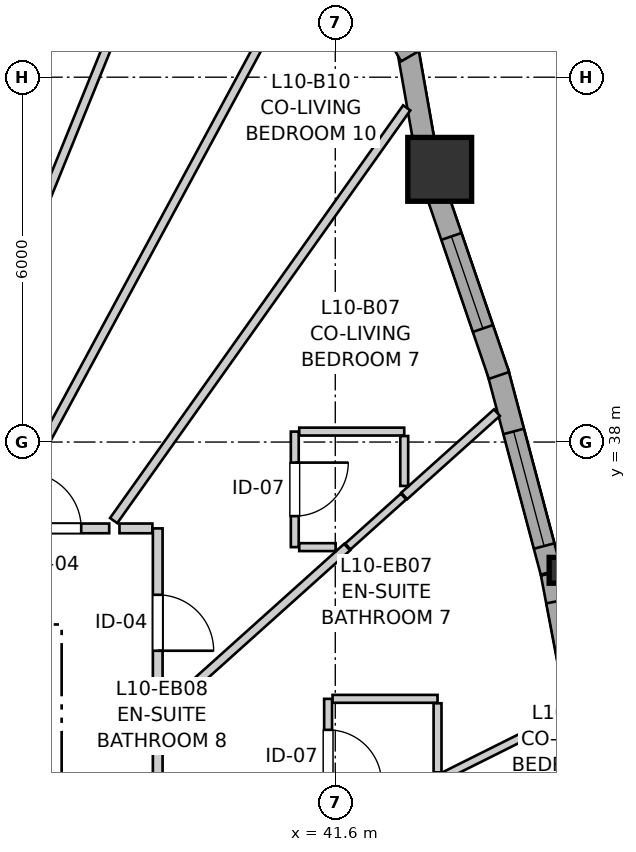
"""IFC4 building model, lengths in metres.
Left out: names, types, materials, properties, quantities, classifications, styles, units other than length and angle.
Written with IfcOpenShell. Run it as: python <this file> out.ifc"""

import sys

from ifc_helpers import new_model, si_unit, direction, frame, frame_2d, origin, origin_2d, place, context, subcontext, project, spatial, rectangle, i_section, extrude, source, transform, mapped, element, fill, save


model = new_model("IFC4")
c1 = context("Model", 3, precision=1e-05, world=origin(), true_north=direction((0.0, 1.0)))
c2 = subcontext(c1, "Body", "Model", "MODEL_VIEW")
j1 = project(units=[si_unit("LENGTHUNIT", "METRE"), si_unit("PLANEANGLEUNIT", "RADIAN")], contexts=[c1])
p1 = place(None, origin())
s1 = spatial("IfcSite", under=j1, at=p1, CompositionType="ELEMENT")
p2 = place(p1, origin())
s2 = spatial("IfcBuilding", under=s1, at=p2, CompositionType="ELEMENT")
p3 = place(p2, frame((0.0, 0.0, 36.6)))
s3 = spatial("IfcBuildingStorey", under=s2, at=p3, CompositionType="ELEMENT", Elevation=36.6)
m1 = source(origin(), c2, "Body", "SweptSolid", [
    extrude(i_section(OverallWidth=0.409, OverallDepth=0.425, WebThickness=0.03, FlangeThickness=0.048, FilletRadius=0.015, at=origin_2d()), origin(), (0.0, 0.0, 1.0), 2.94),
])
p4 = place(p3, frame((45.322, 35.891, 0.0), z_axis=(0.0, 0.0, 1.0), x_axis=(1.0, 0.0, 0.0)))
e1 = element("IfcColumn", 1, at=p4, inside=s3, PredefinedType="PILASTER", context=c2, shape_type="MappedRepresentation", body=[
    mapped(m1, transform((0.0, 0.0, 0.0), x_axis=(1.0, 0.0, 0.0), y_axis=(0.0, 1.0, 0.0), z_axis=(0.0, 0.0, 1.0), scale=1.0)),
])
m2 = source(origin(), c2, "Body", "SweptSolid", [
    extrude(rectangle(XDim=1.05, YDim=1.05, at=origin_2d()), origin(), (0.0, 0.0, 1.0), 2.94),
])
p5 = place(p3, frame((43.317, 42.485, 0.0), z_axis=(0.0, 0.0, 1.0), x_axis=(1.0, 0.0, 0.0)))
e2 = element("IfcColumn", 2, at=p5, inside=s3, PredefinedType="COLUMN", context=c2, shape_type="MappedRepresentation", body=[
    mapped(m2, transform((0.0, 0.0, 0.0), x_axis=(1.0, 0.0, 0.0), y_axis=(0.0, 1.0, 0.0), z_axis=(0.0, 0.0, 1.0), scale=1.0)),
])
p6 = place(p3, frame((45.784, 32.524, 0.0), z_axis=(0.0, 0.0, 1.0), x_axis=(-0.186686485801, 0.982419541754, 0.0)))
e3 = element("IfcWall", 3, at=p6, inside=s3, PredefinedType="SOLIDWALL", context=c2, shape_type="SweptSolid", body=[
    extrude(rectangle(XDim=3.374, YDim=0.35, at=frame_2d((1.687, 0.0))), origin(), (0.0, 0.0, 1.0), 2.42),
])
p7 = place(p6, frame((1.457, 0.0, 0.82)))
e4 = element("IfcOpeningElement", 4, at=p7, cuts=e3, PredefinedType="OPENING", context=c2, shape_type="SweptSolid", body=[
    extrude(rectangle(XDim=1.45, YDim=1.25, at=frame_2d((0.725, 0.625))), frame((0.0, 0.185, 0.0), z_axis=(0.0, -1.0, 0.0), x_axis=(1.0, 0.0, 0.0)), (0.0, 0.0, 1.0), 0.37),
])
p8 = place(p3, frame((45.148, 35.865, 0.0), z_axis=(0.0, 0.0, 1.0), x_axis=(-0.257064434129, 0.966394265663, 0.0)))
e5 = element("IfcWall", 5, at=p8, inside=s3, PredefinedType="SOLIDWALL", context=c2, shape_type="SweptSolid", body=[
    extrude(rectangle(XDim=3.429, YDim=0.35, at=frame_2d((1.715, 0.0))), origin(), (0.0, 0.0, 1.0), 2.42),
])
p9 = place(p8, frame((0.44, 0.0, 0.82)))
e6 = element("IfcOpeningElement", 6, at=p9, cuts=e5, PredefinedType="OPENING", context=c2, shape_type="SweptSolid", body=[
    extrude(rectangle(XDim=1.95, YDim=1.4, at=frame_2d((0.975, 0.7))), frame((0.0, 0.185, 0.0), z_axis=(0.0, -1.0, 0.0), x_axis=(1.0, 0.0, 0.0)), (0.0, 0.0, 1.0), 0.37),
])
p10 = place(p3, frame((44.292, 39.095, 0.0), z_axis=(0.0, 0.0, 1.0), x_axis=(-0.323582370233, 0.946200005112, 0.0)))
e7 = element("IfcWall", 7, at=p10, inside=s3, PredefinedType="SOLIDWALL", context=c2, shape_type="SweptSolid", body=[
    extrude(rectangle(XDim=3.222, YDim=0.35, at=frame_2d((1.611, 0.0))), origin(), (0.0, 0.0, 1.0), 2.42),
])
p11 = place(p10, frame((0.816, 0.0, 0.82)))
e8 = element("IfcOpeningElement", 8, at=p11, cuts=e7, PredefinedType="OPENING", context=c2, shape_type="SweptSolid", body=[
    extrude(rectangle(XDim=1.6, YDim=1.35, at=frame_2d((0.8, 0.675))), frame((0.0, 0.185, 0.0), z_axis=(0.0, -1.0, 0.0), x_axis=(1.0, 0.0, 0.0)), (0.0, 0.0, 1.0), 0.37),
])
p12 = place(p3, frame((43.093, 42.75, 0.0), z_axis=(0.0, 0.0, 1.0), x_axis=(-0.173610462023, 0.984814402553, 0.0)))
e9 = element("IfcWall", 9, at=p12, inside=s3, PredefinedType="SOLIDWALL", context=c2, shape_type="SweptSolid", body=[
    extrude(rectangle(XDim=1.752, YDim=0.35, at=frame_2d((0.876, 0.0))), origin(), (0.0, 0.0, 1.0), 2.42),
])
p13 = place(p3, frame((42.835, 44.348, 0.0), z_axis=(0.0, 0.0, 1.0), x_axis=(-0.499995423472, 0.866028046028, 0.0)))
e10 = element("IfcWall", 10, at=p13, inside=s3, PredefinedType="SOLIDWALL", context=c2, shape_type="SweptSolid", body=[
    extrude(rectangle(XDim=2.09, YDim=0.35, at=frame_2d((1.045, 0.0))), origin(), (0.0, 0.0, 1.0), 2.42),
])
p14 = place(p13, frame((0.42, 0.0, 0.82)))
e11 = element("IfcOpeningElement", 11, at=p14, cuts=e10, PredefinedType="OPENING", context=c2, shape_type="SweptSolid", body=[
    extrude(rectangle(XDim=1.25, YDim=1.35, at=frame_2d((0.625, 0.675))), frame((0.0, 0.185, 0.0), z_axis=(0.0, -1.0, 0.0), x_axis=(1.0, 0.0, 0.0)), (0.0, 0.0, 1.0), 0.37),
])
p15 = place(p3, frame((38.68, 33.496, 0.0), z_axis=(0.0, 0.0, 1.0), x_axis=(0.0, -1.0, 0.0)))
e12 = element("IfcWall", 12, at=p15, inside=s3, PredefinedType="PARTITIONING", context=c2, shape_type="SweptSolid", body=[
    extrude(rectangle(XDim=3.355, YDim=0.16, at=frame_2d((1.677, 0.0))), origin(), (0.0, 0.0, 1.0), 2.94),
])
p16 = place(p15, frame((1.219, 0.0, 0.0)))
e13 = element("IfcOpeningElement", 13, at=p16, cuts=e12, PredefinedType="OPENING", context=c2, shape_type="SweptSolid", body=[
    extrude(rectangle(XDim=0.92, YDim=2.1, at=frame_2d((0.46, 1.05))), frame((0.0, 0.09, 0.0), z_axis=(0.0, -1.0, 0.0), x_axis=(1.0, 0.0, 0.0)), (0.0, 0.0, 1.0), 0.18),
])
p17 = place(p3, frame((38.68, 36.58, 0.0), z_axis=(0.0, 0.0, 1.0), x_axis=(0.0, -1.0, 0.0)))
e14 = element("IfcWall", 14, at=p17, inside=s3, PredefinedType="PARTITIONING", context=c2, shape_type="SweptSolid", body=[
    extrude(rectangle(XDim=3.069, YDim=0.16, at=frame_2d((1.535, 0.0))), origin(), (0.0, 0.0, 1.0), 2.94),
])
p18 = place(p17, frame((1.092, 0.0, 0.0)))
e15 = element("IfcOpeningElement", 15, at=p18, cuts=e14, PredefinedType="OPENING", context=c2, shape_type="SweptSolid", body=[
    extrude(rectangle(XDim=0.92, YDim=2.1, at=frame_2d((0.46, 1.05))), frame((0.0, 0.09, 0.0), z_axis=(0.0, -1.0, 0.0), x_axis=(1.0, 0.0, 0.0)), (0.0, 0.0, 1.0), 0.18),
])
p19 = place(p3, frame((41.482, 33.777, 0.0), z_axis=(0.0, 0.0, 1.0), x_axis=(0.0, -1.0, 0.0)))
e16 = element("IfcWall", 16, at=p19, inside=s3, PredefinedType="PARTITIONING", context=c2, shape_type="SweptSolid", body=[
    extrude(rectangle(XDim=1.9, YDim=0.13, at=frame_2d((0.95, 0.0))), origin(), (0.0, 0.0, 1.0), 2.94),
])
p20 = place(p19, frame((0.51, 0.0, 0.0)))
e17 = element("IfcOpeningElement", 17, at=p20, cuts=e16, PredefinedType="OPENING", context=c2, shape_type="SweptSolid", body=[
    extrude(rectangle(XDim=0.88, YDim=2.05, at=frame_2d((0.44, 1.025))), frame((0.0, 0.075, 0.0), z_axis=(0.0, -1.0, 0.0), x_axis=(1.0, 0.0, 0.0)), (0.0, 0.0, 1.0), 0.15),
])
p21 = place(p3, frame((40.934, 38.172, 0.0), z_axis=(0.0, 0.0, 1.0), x_axis=(0.0, -1.0, 0.0)))
e18 = element("IfcWall", 18, at=p21, inside=s3, PredefinedType="PARTITIONING", context=c2, shape_type="SweptSolid", body=[
    extrude(rectangle(XDim=1.9, YDim=0.13, at=frame_2d((0.95, 0.0))), origin(), (0.0, 0.0, 1.0), 2.94),
])
p22 = place(p21, frame((0.51, 0.0, 0.0)))
e19 = element("IfcOpeningElement", 19, at=p22, cuts=e18, PredefinedType="OPENING", context=c2, shape_type="SweptSolid", body=[
    extrude(rectangle(XDim=0.88, YDim=2.05, at=frame_2d((0.44, 1.025))), frame((0.0, 0.075, 0.0), z_axis=(0.0, -1.0, 0.0), x_axis=(1.0, 0.0, 0.0)), (0.0, 0.0, 1.0), 0.15),
])
p23 = place(p3, frame((36.042, 36.58, 0.0), z_axis=(0.0, 0.0, 1.0), x_axis=(1.0, 0.0, 0.0)))
e20 = element("IfcWall", 20, at=p23, inside=s3, PredefinedType="PARTITIONING", context=c2, shape_type="SweptSolid", body=[
    extrude(rectangle(XDim=1.84, YDim=0.16, at=frame_2d((0.92, 0.0))), origin(), (0.0, 0.0, 1.0), 2.94),
])
p24 = place(p23, frame((0.459, 0.0, 0.0)))
e21 = element("IfcOpeningElement", 21, at=p24, cuts=e20, PredefinedType="OPENING", context=c2, shape_type="SweptSolid", body=[
    extrude(rectangle(XDim=0.92, YDim=2.1, at=frame_2d((0.46, 1.05))), frame((0.0, 0.09, 0.0), z_axis=(0.0, -1.0, 0.0), x_axis=(1.0, 0.0, 0.0)), (0.0, 0.0, 1.0), 0.18),
])
p25 = place(p3, frame((34.686, 36.695, 0.0), z_axis=(0.0, 0.0, 1.0), x_axis=(0.375735926904, 0.926726773776, 0.0)))
e22 = element("IfcWall", 22, at=p25, inside=s3, PredefinedType="PARTITIONING", context=c2, shape_type="SweptSolid", body=[
    extrude(rectangle(XDim=11.769, YDim=0.145, at=frame_2d((5.884, 0.0))), origin(), (0.0, 0.0, 1.0), 2.94),
])
p26 = place(p3, frame((36.125, 36.701, 0.0), z_axis=(0.0, 0.0, 1.0), x_axis=(0.474948586069, 0.880013545686, 0.0)))
e23 = element("IfcWall", 23, at=p26, inside=s3, PredefinedType="PARTITIONING", context=c2, shape_type="SweptSolid", body=[
    extrude(rectangle(XDim=10.889, YDim=0.145, at=frame_2d((5.445, 0.0))), origin(), (0.0, 0.0, 1.0), 2.94),
])
p27 = place(p3, frame((37.955, 36.708, 0.0), z_axis=(0.0, 0.0, 1.0), x_axis=(0.578991718582, 0.81533342248, 0.0)))
e24 = element("IfcWall", 24, at=p27, inside=s3, PredefinedType="PARTITIONING", context=c2, shape_type="SweptSolid", body=[
    extrude(rectangle(XDim=8.325, YDim=0.145, at=frame_2d((4.163, 0.0))), origin(), (0.0, 0.0, 1.0), 2.94),
])
p28 = place(p3, frame((38.814, 33.597, 0.0), z_axis=(0.0, 0.0, 1.0), x_axis=(0.74417856937, 0.667980730927, 0.0)))
e25 = element("IfcWall", 25, at=p28, inside=s3, PredefinedType="PARTITIONING", context=c2, shape_type="SweptSolid", body=[
    extrude(rectangle(XDim=4.005, YDim=0.145, at=frame_2d((2.002, 0.0))), origin(), (0.0, 0.0, 1.0), 2.94),
])
p29 = place(p3, frame((43.267, 32.448, 0.0), z_axis=(0.0, 0.0, 1.0), x_axis=(0.894755827923, 0.446555717014, 0.0)))
e26 = element("IfcWall", 26, at=p29, inside=s3, PredefinedType="PARTITIONING", context=c2, shape_type="SweptSolid", body=[
    extrude(rectangle(XDim=2.375, YDim=0.13, at=frame_2d((1.188, 0.0))), origin(), (0.0, 0.0, 1.0), 2.94),
])
p30 = place(p3, frame((42.734, 37.114, 0.0), z_axis=(0.0, 0.0, 1.0), x_axis=(0.743962922365, 0.668220899214, 0.0)))
e27 = element("IfcWall", 27, at=p30, inside=s3, PredefinedType="PARTITIONING", context=c2, shape_type="SweptSolid", body=[
    extrude(rectangle(XDim=2.05, YDim=0.145, at=frame_2d((1.025, 0.0))), origin(), (0.0, 0.0, 1.0), 2.94),
])
p31 = place(p3, frame((41.007, 38.172, 0.0), z_axis=(0.0, 0.0, 1.0), x_axis=(1.0, 0.0, 0.0)))
e28 = element("IfcWall", 28, at=p31, inside=s3, PredefinedType="PARTITIONING", context=c2, shape_type="SweptSolid", body=[
    extrude(rectangle(XDim=1.727, YDim=0.13, at=frame_2d((0.863, 0.0))), origin(), (0.0, 0.0, 1.0), 2.94),
])
p32 = place(p3, frame((41.555, 33.777, 0.0), z_axis=(0.0, 0.0, 1.0), x_axis=(1.0, 0.0, 0.0)))
e29 = element("IfcWall", 29, at=p32, inside=s3, PredefinedType="PARTITIONING", context=c2, shape_type="SweptSolid", body=[
    extrude(rectangle(XDim=1.727, YDim=0.13, at=frame_2d((0.864, 0.0))), origin(), (0.0, 0.0, 1.0), 2.94),
])
p33 = place(p3, frame((43.282, 32.568, 0.0), z_axis=(0.0, 0.0, 1.0), x_axis=(0.0, 1.0, 0.0)))
e30 = element("IfcWall", 30, at=p33, inside=s3, PredefinedType="PARTITIONING", context=c2, shape_type="SweptSolid", body=[
    extrude(rectangle(XDim=1.136, YDim=0.13, at=frame_2d((0.568, 0.0))), origin(), (0.0, 0.0, 1.0), 2.94),
])
p34 = place(p3, frame((41.806, 36.282, 0.0), z_axis=(0.0, 0.0, 1.0), x_axis=(0.744525261569, 0.667594289135, 0.0)))
e31 = element("IfcWall", 31, at=p34, inside=s3, PredefinedType="PARTITIONING", context=c2, shape_type="SweptSolid", body=[
    extrude(rectangle(XDim=1.231, YDim=0.13, at=frame_2d((0.616, 0.0))), origin(), (0.0, 0.0, 1.0), 2.94),
])
p35 = place(p3, frame((42.734, 37.278, 0.0), z_axis=(0.0, 0.0, 1.0), x_axis=(0.0, 1.0, 0.0)))
e32 = element("IfcWall", 32, at=p35, inside=s3, PredefinedType="PARTITIONING", context=c2, shape_type="SweptSolid", body=[
    extrude(rectangle(XDim=0.821, YDim=0.13, at=frame_2d((0.411, 0.0))), origin(), (0.0, 0.0, 1.0), 2.94),
])
p36 = place(p3, frame((41.007, 36.272, 0.0), z_axis=(0.0, 0.0, 1.0), x_axis=(1.0, 0.0, 0.0)))
e33 = element("IfcWall", 33, at=p36, inside=s3, PredefinedType="PARTITIONING", context=c2, shape_type="SweptSolid", body=[
    extrude(rectangle(XDim=0.599, YDim=0.13, at=frame_2d((0.299, 0.0))), origin(), (0.0, 0.0, 1.0), 2.94),
])
p37 = place(p3, frame((38.051, 36.58, 0.0), z_axis=(0.0, 0.0, 1.0), x_axis=(1.0, 0.0, 0.0)))
e34 = element("IfcWall", 34, at=p37, inside=s3, PredefinedType="PARTITIONING", context=c2, shape_type="SweptSolid", body=[
    extrude(rectangle(XDim=0.541, YDim=0.16, at=frame_2d((0.271, 0.0))), origin(), (0.0, 0.0, 1.0), 2.94),
])
m3 = source(origin(), c2, "Body", "SweptSolid", [
    extrude(rectangle(XDim=1.45, YDim=1.25, at=frame_2d((0.725, 0.625))), frame((0.0, 0.03, 0.0), z_axis=(0.0, -1.0, 0.0), x_axis=(1.0, 0.0, 0.0)), (0.0, 0.0, 1.0), 0.06),
])
p38 = place(p7, origin())
e35 = element("IfcWindow", 35, at=p38, inside=s3, PartitioningType="SINGLE_PANEL", PredefinedType="WINDOW", context=c2, shape_type="MappedRepresentation", body=[
    mapped(m3, transform((0.0, 0.0, 0.0), x_axis=(1.0, 0.0, 0.0), y_axis=(0.0, 1.0, 0.0), z_axis=(0.0, 0.0, 1.0), scale=1.0)),
])
fill(e4, e35)
m4 = source(origin(), c2, "Body", "SweptSolid", [
    extrude(rectangle(XDim=1.95, YDim=1.4, at=frame_2d((0.975, 0.7))), frame((0.0, 0.03, 0.0), z_axis=(0.0, -1.0, 0.0), x_axis=(1.0, 0.0, 0.0)), (0.0, 0.0, 1.0), 0.06),
])
p39 = place(p9, origin())
e36 = element("IfcWindow", 36, at=p39, inside=s3, PartitioningType="SINGLE_PANEL", PredefinedType="WINDOW", context=c2, shape_type="MappedRepresentation", body=[
    mapped(m4, transform((0.0, 0.0, 0.0), x_axis=(1.0, 0.0, 0.0), y_axis=(0.0, 1.0, 0.0), z_axis=(0.0, 0.0, 1.0), scale=1.0)),
])
fill(e6, e36)
m5 = source(origin(), c2, "Body", "SweptSolid", [
    extrude(rectangle(XDim=1.6, YDim=1.35, at=frame_2d((0.8, 0.675))), frame((0.0, 0.03, 0.0), z_axis=(0.0, -1.0, 0.0), x_axis=(1.0, 0.0, 0.0)), (0.0, 0.0, 1.0), 0.06),
])
p40 = place(p11, origin())
e37 = element("IfcWindow", 37, at=p40, inside=s3, PartitioningType="SINGLE_PANEL", PredefinedType="WINDOW", context=c2, shape_type="MappedRepresentation", body=[
    mapped(m5, transform((0.0, 0.0, 0.0), x_axis=(1.0, 0.0, 0.0), y_axis=(0.0, 1.0, 0.0), z_axis=(0.0, 0.0, 1.0), scale=1.0)),
])
fill(e8, e37)
m6 = source(origin(), c2, "Body", "SweptSolid", [
    extrude(rectangle(XDim=0.92, YDim=2.1, at=frame_2d((0.46, 1.05))), frame((0.0, 0.025, 0.0), z_axis=(0.0, -1.0, 0.0), x_axis=(1.0, 0.0, 0.0)), (0.0, 0.0, 1.0), 0.05),
])
p41 = place(p18, origin())
e38 = element("IfcDoor", 38, at=p41, inside=s3, OperationType="SINGLE_SWING_RIGHT", PredefinedType="DOOR", context=c2, shape_type="MappedRepresentation", body=[
    mapped(m6, transform((0.0, 0.0, 0.0), x_axis=(1.0, 0.0, 0.0), y_axis=(0.0, 1.0, 0.0), z_axis=(0.0, 0.0, 1.0), scale=1.0)),
])
fill(e15, e38)
m7 = source(origin(), c2, "Body", "SweptSolid", [
    extrude(rectangle(XDim=0.88, YDim=2.05, at=frame_2d((0.44, 1.025))), frame((0.0, 0.025, 0.0), z_axis=(0.0, -1.0, 0.0), x_axis=(1.0, 0.0, 0.0)), (0.0, 0.0, 1.0), 0.05),
])
p42 = place(p20, origin())
e39 = element("IfcDoor", 39, at=p42, inside=s3, OperationType="SINGLE_SWING_RIGHT", PredefinedType="DOOR", context=c2, shape_type="MappedRepresentation", body=[
    mapped(m7, transform((0.0, 0.0, 0.0), x_axis=(1.0, 0.0, 0.0), y_axis=(0.0, 1.0, 0.0), z_axis=(0.0, 0.0, 1.0), scale=1.0)),
])
fill(e17, e39)
p43 = place(p22, origin())
e40 = element("IfcDoor", 40, at=p43, inside=s3, OperationType="SINGLE_SWING_LEFT", PredefinedType="DOOR", context=c2, shape_type="MappedRepresentation", body=[
    mapped(m7, transform((0.0, 0.0, 0.0), x_axis=(1.0, 0.0, 0.0), y_axis=(0.0, 1.0, 0.0), z_axis=(0.0, 0.0, 1.0), scale=1.0)),
])
fill(e19, e40)
p44 = place(p24, origin())
e41 = element("IfcDoor", 41, at=p44, inside=s3, OperationType="SINGLE_SWING_LEFT", PredefinedType="DOOR", context=c2, shape_type="MappedRepresentation", body=[
    mapped(m6, transform((0.0, 0.0, 0.0), x_axis=(1.0, 0.0, 0.0), y_axis=(0.0, 1.0, 0.0), z_axis=(0.0, 0.0, 1.0), scale=1.0)),
])
fill(e21, e41)
save(model, sys.argv[1])
